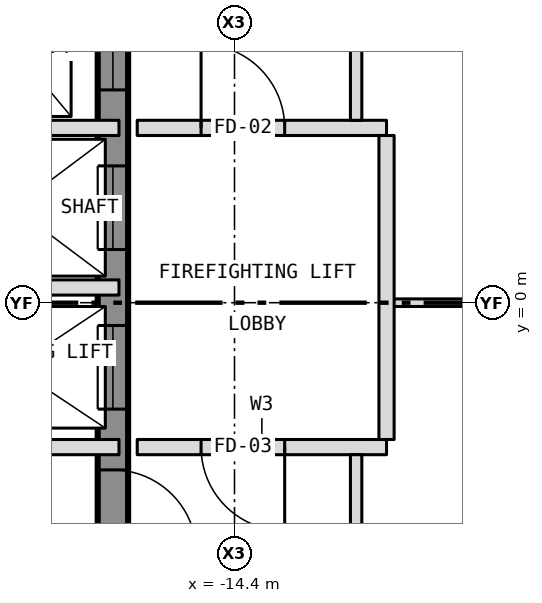
"""IFC4 building model, lengths in metres.
Left out: names, types, materials, properties, quantities, classifications, styles, units other than length and angle.
Written with IfcOpenShell. Run it as: python <this file> out.ifc"""

import sys

from ifc_helpers import new_model, si_unit, direction, frame, frame_2d, origin, place, context, subcontext, project, spatial, rectangle, extrude, element, fill, save


model = new_model("IFC4")
c1 = context("Model", 3, precision=1e-05, world=origin(), true_north=direction((0.0, 1.0)))
c2 = subcontext(c1, "Body", "Model", "MODEL_VIEW")
j1 = project(units=[si_unit("LENGTHUNIT", "METRE"), si_unit("PLANEANGLEUNIT", "RADIAN")], contexts=[c1])
p1 = place(None, origin())
s1 = spatial("IfcSite", under=j1, at=p1, CompositionType="ELEMENT")
p2 = place(p1, origin())
s2 = spatial("IfcBuilding", under=s1, at=p2, CompositionType="ELEMENT")
p3 = place(p2, frame((0.0, 0.0, 265.5)))
s3 = spatial("IfcBuildingStorey", under=s2, at=p3, CompositionType="ELEMENT", Elevation=265.5)
p4 = place(p3, frame((-16.0, -10.8, 0.0), z_axis=(0.0, 0.0, 1.0), x_axis=(0.0, 1.0, 0.0)))
e1 = element("IfcWall", 1, at=p4, inside=s3, PredefinedType="SHEAR", context=c2, shape_type="SweptSolid", body=[
    extrude(rectangle(XDim=21.6, YDim=0.4, at=frame_2d((10.8, 0.0))), origin(), (0.0, 0.0, 1.0), 3.25),
])
p5 = place(p4, frame((9.4, 0.0, 0.0)))
e2 = element("IfcOpeningElement", 2, at=p5, cuts=e1, PredefinedType="OPENING", context=c2, shape_type="SweptSolid", body=[
    extrude(rectangle(XDim=1.1, YDim=2.1, at=frame_2d((0.55, 1.05))), frame((0.0, 0.212, 0.0), z_axis=(0.0, -1.0, 0.0), x_axis=(1.0, 0.0, 0.0)), (0.0, 0.0, 1.0), 0.424),
])
p6 = place(p4, frame((11.5, 0.0, 0.0)))
e3 = element("IfcOpeningElement", 3, at=p6, cuts=e1, PredefinedType="OPENING", context=c2, shape_type="SweptSolid", body=[
    extrude(rectangle(XDim=1.1, YDim=2.1, at=frame_2d((0.55, 1.05))), frame((0.0, 0.212, 0.0), z_axis=(0.0, -1.0, 0.0), x_axis=(1.0, 0.0, 0.0)), (0.0, 0.0, 1.0), 0.424),
])
p7 = place(p4, frame((13.6, 0.0, 0.0)))
e4 = element("IfcOpeningElement", 4, at=p7, cuts=e1, PredefinedType="OPENING", context=c2, shape_type="SweptSolid", body=[
    extrude(rectangle(XDim=1.1, YDim=2.1, at=frame_2d((0.55, 1.05))), frame((0.0, 0.212, 0.0), z_axis=(0.0, -1.0, 0.0), x_axis=(1.0, 0.0, 0.0)), (0.0, 0.0, 1.0), 0.424),
])
p8 = place(p4, frame((15.7, 0.0, 0.0)))
e5 = element("IfcOpeningElement", 5, at=p8, cuts=e1, PredefinedType="OPENING", context=c2, shape_type="SweptSolid", body=[
    extrude(rectangle(XDim=1.1, YDim=2.1, at=frame_2d((0.55, 1.05))), frame((0.0, 0.212, 0.0), z_axis=(0.0, -1.0, 0.0), x_axis=(1.0, 0.0, 0.0)), (0.0, 0.0, 1.0), 0.424),
])
p9 = place(p4, frame((17.8, 0.0, 0.0)))
e6 = element("IfcOpeningElement", 6, at=p9, cuts=e1, PredefinedType="OPENING", context=c2, shape_type="SweptSolid", body=[
    extrude(rectangle(XDim=1.1, YDim=2.1, at=frame_2d((0.55, 1.05))), frame((0.0, 0.212, 0.0), z_axis=(0.0, -1.0, 0.0), x_axis=(1.0, 0.0, 0.0)), (0.0, 0.0, 1.0), 0.424),
])
p10 = place(p4, frame((0.458, 0.0, 0.0)))
e7 = element("IfcOpeningElement", 7, at=p10, cuts=e1, PredefinedType="OPENING", context=c2, shape_type="SweptSolid", body=[
    extrude(rectangle(XDim=1.1, YDim=2.1, at=frame_2d((0.55, 1.05))), frame((0.0, 0.212, 0.0), z_axis=(0.0, -1.0, 0.0), x_axis=(1.0, 0.0, 0.0)), (0.0, 0.0, 1.0), 0.424),
])
p11 = place(p4, frame((7.5, 0.0, 0.0)))
e8 = element("IfcOpeningElement", 8, at=p11, cuts=e1, PredefinedType="OPENING", context=c2, shape_type="SweptSolid", body=[
    extrude(rectangle(XDim=1.1, YDim=2.1, at=frame_2d((0.55, 1.05))), frame((0.0, 0.212, 0.0), z_axis=(0.0, -1.0, 0.0), x_axis=(1.0, 0.0, 0.0)), (0.0, 0.0, 1.0), 0.424),
])
p12 = place(p4, frame((20.0, 0.0, 0.0)))
e9 = element("IfcOpeningElement", 9, at=p12, cuts=e1, PredefinedType="OPENING", context=c2, shape_type="SweptSolid", body=[
    extrude(rectangle(XDim=0.9, YDim=2.1, at=frame_2d((0.45, 1.05))), frame((0.0, 0.212, 0.0), z_axis=(0.0, -1.0, 0.0), x_axis=(1.0, 0.0, 0.0)), (0.0, 0.0, 1.0), 0.424),
])
p13 = place(p3, frame((-20.28, -1.9, 0.0), z_axis=(0.0, 0.0, 1.0), x_axis=(1.0, 0.0, 0.0)))
e10 = element("IfcWall", 10, at=p13, inside=s3, PredefinedType="PARTITIONING", context=c2, shape_type="SweptSolid", body=[
    extrude(rectangle(XDim=4.36, YDim=0.2, at=frame_2d((2.18, 0.0))), origin(), (0.0, 0.0, 1.0), 3.25),
])
p14 = place(p13, frame((0.28, 0.0, 0.0)))
e11 = element("IfcOpeningElement", 11, at=p14, cuts=e10, PredefinedType="OPENING", context=c2, shape_type="SweptSolid", body=[
    extrude(rectangle(XDim=0.9, YDim=2.1, at=frame_2d((0.45, 1.05))), frame((0.0, 0.112, 0.0), z_axis=(0.0, -1.0, 0.0), x_axis=(1.0, 0.0, 0.0)), (0.0, 0.0, 1.0), 0.224),
])
p15 = place(p3, frame((-15.68, -1.9, 0.0), z_axis=(0.0, 0.0, 1.0), x_axis=(1.0, 0.0, 0.0)))
e12 = element("IfcWall", 12, at=p15, inside=s3, PredefinedType="PARTITIONING", context=c2, shape_type="SweptSolid", body=[
    extrude(rectangle(XDim=3.28, YDim=0.2, at=frame_2d((1.64, 0.0))), origin(), (0.0, 0.0, 1.0), 3.35),
])
p16 = place(p15, frame((0.84, 0.0, 0.0)))
e13 = element("IfcOpeningElement", 13, at=p16, cuts=e12, PredefinedType="OPENING", context=c2, shape_type="SweptSolid", body=[
    extrude(rectangle(XDim=1.1, YDim=2.1, at=frame_2d((0.55, 1.05))), frame((0.0, 0.112, 0.0), z_axis=(0.0, -1.0, 0.0), x_axis=(1.0, 0.0, 0.0)), (0.0, 0.0, 1.0), 0.224),
])
p17 = place(p3, frame((-12.4, 0.0, 0.0), z_axis=(0.0, 0.0, 1.0), x_axis=(1.0, 0.0, 0.0)))
e14 = element("IfcWall", 14, at=p17, inside=s3, PredefinedType="PARTITIONING", context=c2, shape_type="SweptSolid", body=[
    extrude(rectangle(XDim=2.616, YDim=0.1, at=frame_2d((1.308, 0.0))), origin(), (0.0, 0.0, 1.0), 2.728),
])
for number, where, z_axis, x_axis in (
    (15, (-18.8, 0.2, 0.0), (0.0, 0.0, 1.0), (1.0, 0.0, 0.0)),
    (16, (-18.8, 2.3, 0.0), (0.0, 0.0, 1.0), (1.0, 0.0, 0.0)),
):
    element("IfcWall", number, at=place(p3, frame(where, z_axis=z_axis, x_axis=x_axis)), inside=s3, PredefinedType="PARTITIONING", context=c2, shape_type="SweptSolid", body=[
        extrude(rectangle(XDim=2.88, YDim=0.2, at=frame_2d((1.44, 0.0))), origin(), (0.0, 0.0, 1.0), 3.25),
    ])
p18 = place(p3, frame((-15.68, 2.3, 0.0), z_axis=(0.0, 0.0, 1.0), x_axis=(1.0, 0.0, 0.0)))
e17 = element("IfcWall", 17, at=p18, inside=s3, PredefinedType="PARTITIONING", context=c2, shape_type="SweptSolid", body=[
    extrude(rectangle(XDim=3.28, YDim=0.2, at=frame_2d((1.64, 0.0))), origin(), (0.0, 0.0, 1.0), 3.35),
])
p19 = place(p18, frame((0.84, 0.0, 0.0)))
e18 = element("IfcOpeningElement", 18, at=p19, cuts=e17, PredefinedType="OPENING", context=c2, shape_type="SweptSolid", body=[
    extrude(rectangle(XDim=1.1, YDim=2.1, at=frame_2d((0.55, 1.05))), frame((0.0, 0.112, 0.0), z_axis=(0.0, -1.0, 0.0), x_axis=(1.0, 0.0, 0.0)), (0.0, 0.0, 1.0), 0.224),
])
p20 = place(p3, frame((-12.8, -10.725, 0.0), z_axis=(0.0, 0.0, 1.0), x_axis=(0.0, 1.0, 0.0)))
e19 = element("IfcWall", 19, at=p20, inside=s3, PredefinedType="PARTITIONING", context=c2, shape_type="SweptSolid", body=[
    extrude(rectangle(XDim=8.725, YDim=0.15, at=frame_2d((4.363, 0.0))), origin(), (0.0, 0.0, 1.0), 3.35),
])
p21 = place(p20, frame((4.225, 0.0, 0.0)))
e20 = element("IfcOpeningElement", 20, at=p21, cuts=e19, PredefinedType="OPENING", context=c2, shape_type="SweptSolid", body=[
    extrude(rectangle(XDim=0.9, YDim=2.1, at=frame_2d((0.45, 1.05))), frame((0.0, 0.087, 0.0), z_axis=(0.0, -1.0, 0.0), x_axis=(1.0, 0.0, 0.0)), (0.0, 0.0, 1.0), 0.174),
])
p22 = place(p3, frame((-12.8, 2.4, 0.0), z_axis=(0.0, 0.0, 1.0), x_axis=(0.0, 1.0, 0.0)))
e21 = element("IfcWall", 21, at=p22, inside=s3, PredefinedType="PARTITIONING", context=c2, shape_type="SweptSolid", body=[
    extrude(rectangle(XDim=8.325, YDim=0.15, at=frame_2d((4.163, 0.0))), origin(), (0.0, 0.0, 1.0), 3.35),
])
p23 = place(p22, frame((2.89, 0.0, 0.0)))
e22 = element("IfcOpeningElement", 22, at=p23, cuts=e21, PredefinedType="OPENING", context=c2, shape_type="SweptSolid", body=[
    extrude(rectangle(XDim=0.9, YDim=2.1, at=frame_2d((0.45, 1.05))), frame((0.0, 0.087, 0.0), z_axis=(0.0, -1.0, 0.0), x_axis=(1.0, 0.0, 0.0)), (0.0, 0.0, 1.0), 0.174),
])
p24 = place(p3, frame((-12.4, -1.8, 0.0), z_axis=(0.0, 0.0, 1.0), x_axis=(0.0, 1.0, 0.0)))
e23 = element("IfcWall", 23, at=p24, inside=s3, PredefinedType="PARTITIONING", context=c2, shape_type="SweptSolid", body=[
    extrude(rectangle(XDim=4.0, YDim=0.2, at=frame_2d((2.0, 0.0))), origin(), (0.0, 0.0, 1.0), 3.35),
])
p25 = place(p5, origin())
e24 = element("IfcDoor", 24, at=p25, inside=s3, OperationType="SLIDING_TO_LEFT", PredefinedType="DOOR", context=c2, shape_type="SweptSolid", body=[
    extrude(rectangle(XDim=1.1, YDim=2.1, at=frame_2d((0.55, 1.05))), frame((0.0, 0.025, 0.0), z_axis=(0.0, -1.0, 0.0), x_axis=(1.0, 0.0, 0.0)), (0.0, 0.0, 1.0), 0.05),
])
fill(e2, e24)
p26 = place(p6, origin())
e25 = element("IfcDoor", 25, at=p26, inside=s3, OperationType="SLIDING_TO_LEFT", PredefinedType="DOOR", context=c2, shape_type="SweptSolid", body=[
    extrude(rectangle(XDim=1.1, YDim=2.1, at=frame_2d((0.55, 1.05))), frame((0.0, 0.025, 0.0), z_axis=(0.0, -1.0, 0.0), x_axis=(1.0, 0.0, 0.0)), (0.0, 0.0, 1.0), 0.05),
])
fill(e3, e25)
p27 = place(p7, origin())
e26 = element("IfcDoor", 26, at=p27, inside=s3, OperationType="SLIDING_TO_LEFT", PredefinedType="DOOR", context=c2, shape_type="SweptSolid", body=[
    extrude(rectangle(XDim=1.1, YDim=2.1, at=frame_2d((0.55, 1.05))), frame((0.0, 0.025, 0.0), z_axis=(0.0, -1.0, 0.0), x_axis=(1.0, 0.0, 0.0)), (0.0, 0.0, 1.0), 0.05),
])
fill(e4, e26)
p28 = place(p11, origin())
e27 = element("IfcDoor", 27, at=p28, inside=s3, OperationType="SINGLE_SWING_LEFT", PredefinedType="DOOR", context=c2, shape_type="SweptSolid", body=[
    extrude(rectangle(XDim=1.1, YDim=2.1, at=frame_2d((0.55, 1.05))), frame((0.0, 0.025, 0.0), z_axis=(0.0, -1.0, 0.0), x_axis=(1.0, 0.0, 0.0)), (0.0, 0.0, 1.0), 0.05),
])
fill(e8, e27)
p29 = place(p19, origin())
e28 = element("IfcDoor", 28, at=p29, inside=s3, OperationType="SINGLE_SWING_LEFT", PredefinedType="DOOR", context=c2, shape_type="SweptSolid", body=[
    extrude(rectangle(XDim=1.1, YDim=2.1, at=frame_2d((0.55, 1.05))), frame((0.0, 0.025, 0.0), z_axis=(0.0, -1.0, 0.0), x_axis=(1.0, 0.0, 0.0)), (0.0, 0.0, 1.0), 0.05),
])
fill(e18, e28)
p30 = place(p16, origin())
e29 = element("IfcDoor", 29, at=p30, inside=s3, OperationType="SINGLE_SWING_RIGHT", PredefinedType="DOOR", context=c2, shape_type="SweptSolid", body=[
    extrude(rectangle(XDim=1.1, YDim=2.1, at=frame_2d((0.55, 1.05))), frame((0.0, 0.025, 0.0), z_axis=(0.0, -1.0, 0.0), x_axis=(1.0, 0.0, 0.0)), (0.0, 0.0, 1.0), 0.05),
])
fill(e13, e29)
save(model, sys.argv[1])
